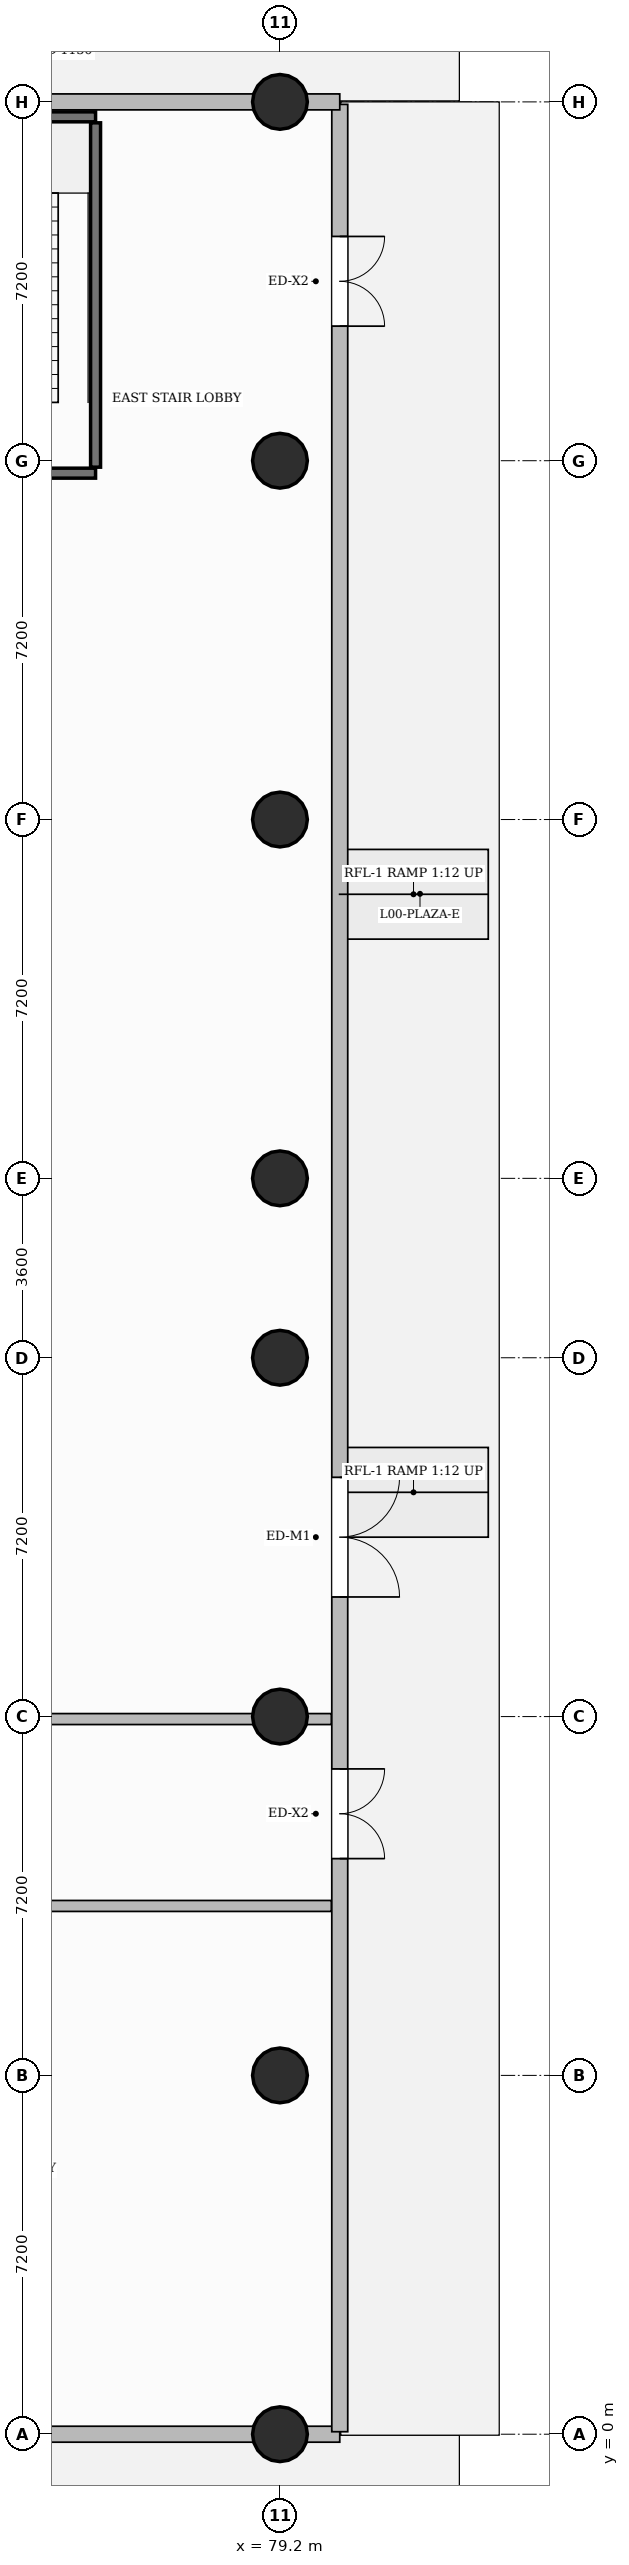
"""IFC4 building model, lengths in metres.
Left out: names, types, materials, properties, quantities, classifications, styles, units other than length and angle.
Written with IfcOpenShell. Run it as: python <this file> out.ifc"""

import sys

from ifc_helpers import new_model, si_unit, direction, frame, frame_2d, origin, origin_2d, place, context, subcontext, project, spatial, rectangle, circle, extrude, source, transform, mapped, element, fill, save


model = new_model("IFC4")
c1 = context("Model", 3, precision=1e-05, world=origin(), true_north=direction((0.0, 1.0)))
c2 = subcontext(c1, "Body", "Model", "MODEL_VIEW")
j1 = project(units=[si_unit("LENGTHUNIT", "METRE"), si_unit("PLANEANGLEUNIT", "RADIAN")], contexts=[c1])
p1 = place(None, origin())
s1 = spatial("IfcSite", under=j1, at=p1, CompositionType="ELEMENT")
p2 = place(p1, origin())
s2 = spatial("IfcBuilding", under=s1, at=p2, CompositionType="ELEMENT")
p3 = place(p2, origin())
s3 = spatial("IfcBuildingStorey", under=s2, at=p3, CompositionType="ELEMENT", Elevation=0.0)
m1 = source(origin(), c2, "Body", "SweptSolid", [
    extrude(circle(Radius=0.55, at=origin_2d()), origin(), (0.0, 0.0, 1.0), 5.4),
])
for number, where, z_axis, x_axis in (
    (1, (79.2, 0.0, 0.0), (0.0, 0.0, 1.0), (1.0, 0.0, 0.0)),
    (2, (79.2, 7.2, 0.0), (0.0, 0.0, 1.0), (1.0, 0.0, 0.0)),
    (3, (79.2, 14.4, 0.0), (0.0, 0.0, 1.0), (1.0, 0.0, 0.0)),
    (4, (79.2, 21.6, 0.0), (0.0, 0.0, 1.0), (1.0, 0.0, 0.0)),
    (5, (79.2, 25.2, 0.0), (0.0, 0.0, 1.0), (1.0, 0.0, 0.0)),
    (6, (79.2, 32.4, 0.0), (0.0, 0.0, 1.0), (1.0, 0.0, 0.0)),
    (7, (79.2, 39.6, 0.0), (0.0, 0.0, 1.0), (1.0, 0.0, 0.0)),
    (8, (79.2, 46.8, 0.0), (0.0, 0.0, 1.0), (1.0, 0.0, 0.0)),
):
    element("IfcColumn", number, at=place(p3, frame(where, z_axis=z_axis, x_axis=x_axis)), inside=s3, PredefinedType="COLUMN", context=c2, shape_type="MappedRepresentation", body=[
        mapped(m1, transform((0.0, 0.0, 0.0), scale=1.0)),
    ])
p4 = place(p3, frame((75.5, 39.47, 0.0), z_axis=(0.0, 0.0, 1.0), x_axis=(0.0, 1.0, 0.0)))
e9 = element("IfcWall", 9, at=p4, inside=s3, PredefinedType="SHEAR", context=c2, shape_type="SweptSolid", body=[
    extrude(rectangle(XDim=6.91, YDim=0.2, at=frame_2d((3.455, 0.0))), origin(), (0.0, 0.0, 1.0), 5.4),
])
p5 = place(p3, frame((72.56, 46.5, 0.0), z_axis=(0.0, 0.0, 1.0), x_axis=(1.0, 0.0, 0.0)))
e10 = element("IfcWall", 10, at=p5, inside=s3, PredefinedType="SHEAR", context=c2, shape_type="SweptSolid", body=[
    extrude(rectangle(XDim=2.94, YDim=0.2, at=frame_2d((1.47, 0.0))), origin(), (0.0, 0.0, 1.0), 5.4),
])
p6 = place(p3, frame((72.56, 39.35, 0.0), z_axis=(0.0, 0.0, 1.0), x_axis=(1.0, 0.0, 0.0)))
e11 = element("IfcWall", 11, at=p6, inside=s3, PredefinedType="SHEAR", context=c2, shape_type="SweptSolid", body=[
    extrude(rectangle(XDim=2.94, YDim=0.2, at=frame_2d((1.47, 0.0))), origin(), (0.0, 0.0, 1.0), 5.4),
])
p7 = place(p6, frame((0.985, 0.0, 0.0)))
e12 = element("IfcOpeningElement", 12, at=p7, cuts=e11, PredefinedType="OPENING", context=c2, shape_type="SweptSolid", body=[
    extrude(rectangle(XDim=1.05, YDim=2.2, at=frame_2d((0.525, 1.1))), frame((0.0, 0.11, 0.0), z_axis=(0.0, -1.0, 0.0), x_axis=(1.0, 0.0, 0.0)), (0.0, 0.0, 1.0), 0.22),
])
p8 = place(p3, frame((50.54, 10.6, 0.0), z_axis=(0.0, 0.0, 1.0), x_axis=(1.0, 0.0, 0.0)))
e13 = element("IfcWall", 13, at=p8, inside=s3, PredefinedType="PARTITIONING", context=c2, shape_type="SweptSolid", body=[
    extrude(rectangle(XDim=29.692, YDim=0.22, at=frame_2d((14.846, 0.0))), origin(), (0.0, 0.0, 1.0), 5.1),
])
p9 = place(p8, frame((13.71, 0.0, 0.0)))
e14 = element("IfcOpeningElement", 14, at=p9, cuts=e13, PredefinedType="OPENING", context=c2, shape_type="SweptSolid", body=[
    extrude(rectangle(XDim=1.5, YDim=2.2, at=frame_2d((0.75, 1.1))), frame((0.0, 0.12, 0.0), z_axis=(0.0, -1.0, 0.0), x_axis=(1.0, 0.0, 0.0)), (0.0, 0.0, 1.0), 0.24),
])
p10 = place(p3, frame((50.54, 14.35, 0.0), z_axis=(0.0, 0.0, 1.0), x_axis=(1.0, 0.0, 0.0)))
e15 = element("IfcWall", 15, at=p10, inside=s3, PredefinedType="PARTITIONING", context=c2, shape_type="SweptSolid", body=[
    extrude(rectangle(XDim=29.692, YDim=0.22, at=frame_2d((14.846, 0.0))), origin(), (0.0, 0.0, 1.0), 4.085),
])
p11 = place(p10, frame((10.435, 0.0, 0.0)))
e16 = element("IfcOpeningElement", 16, at=p11, cuts=e15, PredefinedType="OPENING", context=c2, shape_type="SweptSolid", body=[
    extrude(rectangle(XDim=1.05, YDim=2.15, at=frame_2d((0.525, 1.075))), frame((0.0, 0.12, 0.0), z_axis=(0.0, -1.0, 0.0), x_axis=(1.0, 0.0, 0.0)), (0.0, 0.0, 1.0), 0.24),
])
p12 = place(p3, frame((28.35, 0.0, 0.0), z_axis=(0.0, 0.0, 1.0), x_axis=(1.0, 0.0, 0.0)))
e17 = element("IfcWall", 17, at=p12, inside=s3, PredefinedType="SOLIDWALL", context=c2, shape_type="SweptSolid", body=[
    extrude(rectangle(XDim=52.05, YDim=0.32, at=frame_2d((26.025, 0.0))), origin(), (0.0, 0.0, 1.0), 4.085),
])
p13 = place(p12, frame((24.8, 0.0, 0.0)))
e18 = element("IfcOpeningElement", 18, at=p13, cuts=e17, PredefinedType="OPENING", context=c2, shape_type="SweptSolid", body=[
    extrude(rectangle(XDim=1.1, YDim=2.2, at=frame_2d((0.55, 1.1))), frame((0.0, 0.17, 0.0), z_axis=(0.0, -1.0, 0.0), x_axis=(1.0, 0.0, 0.0)), (0.0, 0.0, 1.0), 0.34),
])
p14 = place(p12, frame((33.65, 0.0, 0.0)))
e19 = element("IfcOpeningElement", 19, at=p14, cuts=e17, PredefinedType="OPENING", context=c2, shape_type="SweptSolid", body=[
    extrude(rectangle(XDim=2.4, YDim=2.8, at=frame_2d((1.2, 1.4))), frame((0.0, 0.17, 0.0), z_axis=(0.0, -1.0, 0.0), x_axis=(1.0, 0.0, 0.0)), (0.0, 0.0, 1.0), 0.34),
])
p15 = place(p3, frame((80.4, 0.05, 0.0), z_axis=(0.0, 0.0, 1.0), x_axis=(0.0, 1.0, 0.0)))
e20 = element("IfcWall", 20, at=p15, inside=s3, PredefinedType="SOLIDWALL", context=c2, shape_type="SweptSolid", body=[
    extrude(rectangle(XDim=46.7, YDim=0.32, at=frame_2d((23.35, 0.0))), origin(), (0.0, 0.0, 1.0), 5.1),
])
p16 = place(p15, frame((11.5, 0.0, 0.0)))
e21 = element("IfcOpeningElement", 21, at=p16, cuts=e20, PredefinedType="OPENING", context=c2, shape_type="SweptSolid", body=[
    extrude(rectangle(XDim=1.8, YDim=2.4, at=frame_2d((0.9, 1.2))), frame((0.0, 0.17, 0.0), z_axis=(0.0, -1.0, 0.0), x_axis=(1.0, 0.0, 0.0)), (0.0, 0.0, 1.0), 0.34),
])
p17 = place(p15, frame((16.75, 0.0, 0.0)))
e22 = element("IfcOpeningElement", 22, at=p17, cuts=e20, PredefinedType="OPENING", context=c2, shape_type="SweptSolid", body=[
    extrude(rectangle(XDim=2.4, YDim=2.8, at=frame_2d((1.2, 1.4))), frame((0.0, 0.17, 0.0), z_axis=(0.0, -1.0, 0.0), x_axis=(1.0, 0.0, 0.0)), (0.0, 0.0, 1.0), 0.34),
])
p18 = place(p15, frame((42.25, 0.0, 0.0)))
e23 = element("IfcOpeningElement", 23, at=p18, cuts=e20, PredefinedType="OPENING", context=c2, shape_type="SweptSolid", body=[
    extrude(rectangle(XDim=1.8, YDim=2.4, at=frame_2d((0.9, 1.2))), frame((0.0, 0.17, 0.0), z_axis=(0.0, -1.0, 0.0), x_axis=(1.0, 0.0, 0.0)), (0.0, 0.0, 1.0), 0.34),
])
p19 = place(p3, frame((49.8, 46.8, 0.0), z_axis=(0.0, 0.0, 1.0), x_axis=(1.0, 0.0, 0.0)))
e24 = element("IfcWall", 24, at=p19, inside=s3, PredefinedType="SOLIDWALL", context=c2, shape_type="SweptSolid", body=[
    extrude(rectangle(XDim=30.6, YDim=0.32, at=frame_2d((15.3, 0.0))), origin(), (0.0, 0.0, 1.0), 4.085),
])
m2 = source(origin(), c2, "Body", "SweptSolid", [
    extrude(rectangle(XDim=1.8, YDim=2.4, at=frame_2d((0.9, 1.2))), frame((0.0, 0.025, 0.0), z_axis=(0.0, -1.0, 0.0), x_axis=(1.0, 0.0, 0.0)), (0.0, 0.0, 1.0), 0.05),
])
p20 = place(p16, frame((1.8, 0.0, 0.0), z_axis=(0.0, 0.0, 1.0), x_axis=(-1.0, 0.0, 0.0)))
e25 = element("IfcDoor", 25, at=p20, inside=s3, OperationType="DOUBLE_DOOR_SINGLE_SWING", PredefinedType="DOOR", context=c2, shape_type="MappedRepresentation", body=[
    mapped(m2, transform((0.0, 0.0, 0.0), scale=1.0)),
])
fill(e21, e25)
m3 = source(origin(), c2, "Body", "SweptSolid", [
    extrude(rectangle(XDim=2.4, YDim=2.8, at=frame_2d((1.2, 1.4))), frame((0.0, 0.025, 0.0), z_axis=(0.0, -1.0, 0.0), x_axis=(1.0, 0.0, 0.0)), (0.0, 0.0, 1.0), 0.05),
])
p21 = place(p17, frame((2.4, 0.0, 0.0), z_axis=(0.0, 0.0, 1.0), x_axis=(-1.0, 0.0, 0.0)))
e26 = element("IfcDoor", 26, at=p21, inside=s3, OperationType="DOUBLE_DOOR_SINGLE_SWING", PredefinedType="DOOR", context=c2, shape_type="MappedRepresentation", body=[
    mapped(m3, transform((0.0, 0.0, 0.0), scale=1.0)),
])
fill(e22, e26)
p22 = place(p18, frame((1.8, 0.0, 0.0), z_axis=(0.0, 0.0, 1.0), x_axis=(-1.0, 0.0, 0.0)))
e27 = element("IfcDoor", 27, at=p22, inside=s3, OperationType="DOUBLE_DOOR_SINGLE_SWING", PredefinedType="DOOR", context=c2, shape_type="MappedRepresentation", body=[
    mapped(m2, transform((0.0, 0.0, 0.0), scale=1.0)),
])
fill(e23, e27)
save(model, sys.argv[1])
